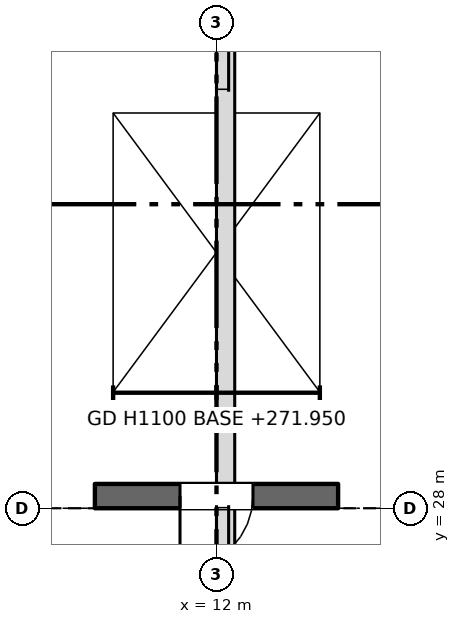
"""IFC4 building model, lengths in metres.
Left out: names, types, materials, properties, quantities, classifications, styles, units other than length and angle.
Written with IfcOpenShell. Run it as: python <this file> out.ifc"""

import sys

from ifc_helpers import new_model, si_unit, direction, frame, frame_2d, origin, place, context, subcontext, project, spatial, rectangle, extrude, element, fill, save


model = new_model("IFC4")
c1 = context("Model", 3, precision=1e-05, world=origin(), true_north=direction((0.0, 1.0)))
c2 = subcontext(c1, "Body", "Model", "MODEL_VIEW")
j1 = project(units=[si_unit("LENGTHUNIT", "METRE"), si_unit("PLANEANGLEUNIT", "RADIAN")], contexts=[c1])
p1 = place(None, origin())
s1 = spatial("IfcSite", under=j1, at=p1, CompositionType="ELEMENT")
p2 = place(p1, origin())
s2 = spatial("IfcBuilding", under=s1, at=p2, CompositionType="ELEMENT")
p3 = place(p2, frame((0.0, 0.0, 271.95)))
s3 = spatial("IfcBuildingStorey", under=s2, at=p3, CompositionType="ELEMENT", Elevation=271.95)
p4 = place(p3, frame((12.15, 6.3, 6.0), z_axis=(0.0, 0.0, 1.0), x_axis=(0.0, 1.0, 0.0)))
e1 = element("IfcWall", 1, at=p4, inside=s3, PredefinedType="PARAPET", context=c2, shape_type="SweptSolid", body=[
    extrude(rectangle(XDim=30.4, YDim=0.3, at=frame_2d((15.2, 0.0))), origin(), (0.0, 0.0, 1.0), 1.1),
])
for number, where, z_axis, x_axis in (
    (2, (10.15, 28.4, 0.0), (0.0, 0.0, 1.0), (0.0, 1.0, 0.0)),
    (3, (13.85, 28.4, 0.0), (0.0, 0.0, 1.0), (0.0, 1.0, 0.0)),
):
    element("IfcWall", number, at=place(p3, frame(where, z_axis=z_axis, x_axis=x_axis)), inside=s3, PredefinedType="SHEAR", context=c2, shape_type="SweptSolid", body=[
        extrude(rectangle(XDim=6.1, YDim=0.3, at=frame_2d((3.05, 0.0))), origin(), (0.0, 0.0, 1.0), 5.5),
    ])
p5 = place(p3, frame((10.0, 28.2, 0.0), z_axis=(0.0, 0.0, 1.0), x_axis=(1.0, 0.0, 0.0)))
e4 = element("IfcWall", 4, at=p5, inside=s3, PredefinedType="SHEAR", context=c2, shape_type="SweptSolid", body=[
    extrude(rectangle(XDim=4.0, YDim=0.4, at=frame_2d((2.0, 0.0))), origin(), (0.0, 0.0, 1.0), 5.5),
])
p6 = place(p5, frame((1.4, 0.0, 0.0)))
e5 = element("IfcOpeningElement", 5, at=p6, cuts=e4, PredefinedType="OPENING", context=c2, shape_type="SweptSolid", body=[
    extrude(rectangle(XDim=1.2, YDim=2.1, at=frame_2d((0.6, 1.05))), frame((0.0, 0.21, 0.0), z_axis=(0.0, -1.0, 0.0), x_axis=(1.0, 0.0, 0.0)), (0.0, 0.0, 1.0), 0.42),
])
p7 = place(p3, frame((10.0, 34.65, 0.0), z_axis=(0.0, 0.0, 1.0), x_axis=(1.0, 0.0, 0.0)))
e6 = element("IfcWall", 6, at=p7, inside=s3, PredefinedType="SHEAR", context=c2, shape_type="SweptSolid", body=[
    extrude(rectangle(XDim=4.0, YDim=0.3, at=frame_2d((2.0, 0.0))), origin(), (0.0, 0.0, 1.0), 5.5),
])
p8 = place(p6, frame((1.2, 0.0, 0.0), z_axis=(0.0, 0.0, 1.0), x_axis=(-1.0, 0.0, 0.0)))
e7 = element("IfcDoor", 7, at=p8, inside=s3, OperationType="SINGLE_SWING_RIGHT", PredefinedType="DOOR", context=c2, shape_type="SweptSolid", body=[
    extrude(rectangle(XDim=1.2, YDim=2.1, at=frame_2d((0.6, 1.05))), frame((0.0, 0.025, 0.0), z_axis=(0.0, -1.0, 0.0), x_axis=(1.0, 0.0, 0.0)), (0.0, 0.0, 1.0), 0.05),
])
fill(e5, e7)
save(model, sys.argv[1])
